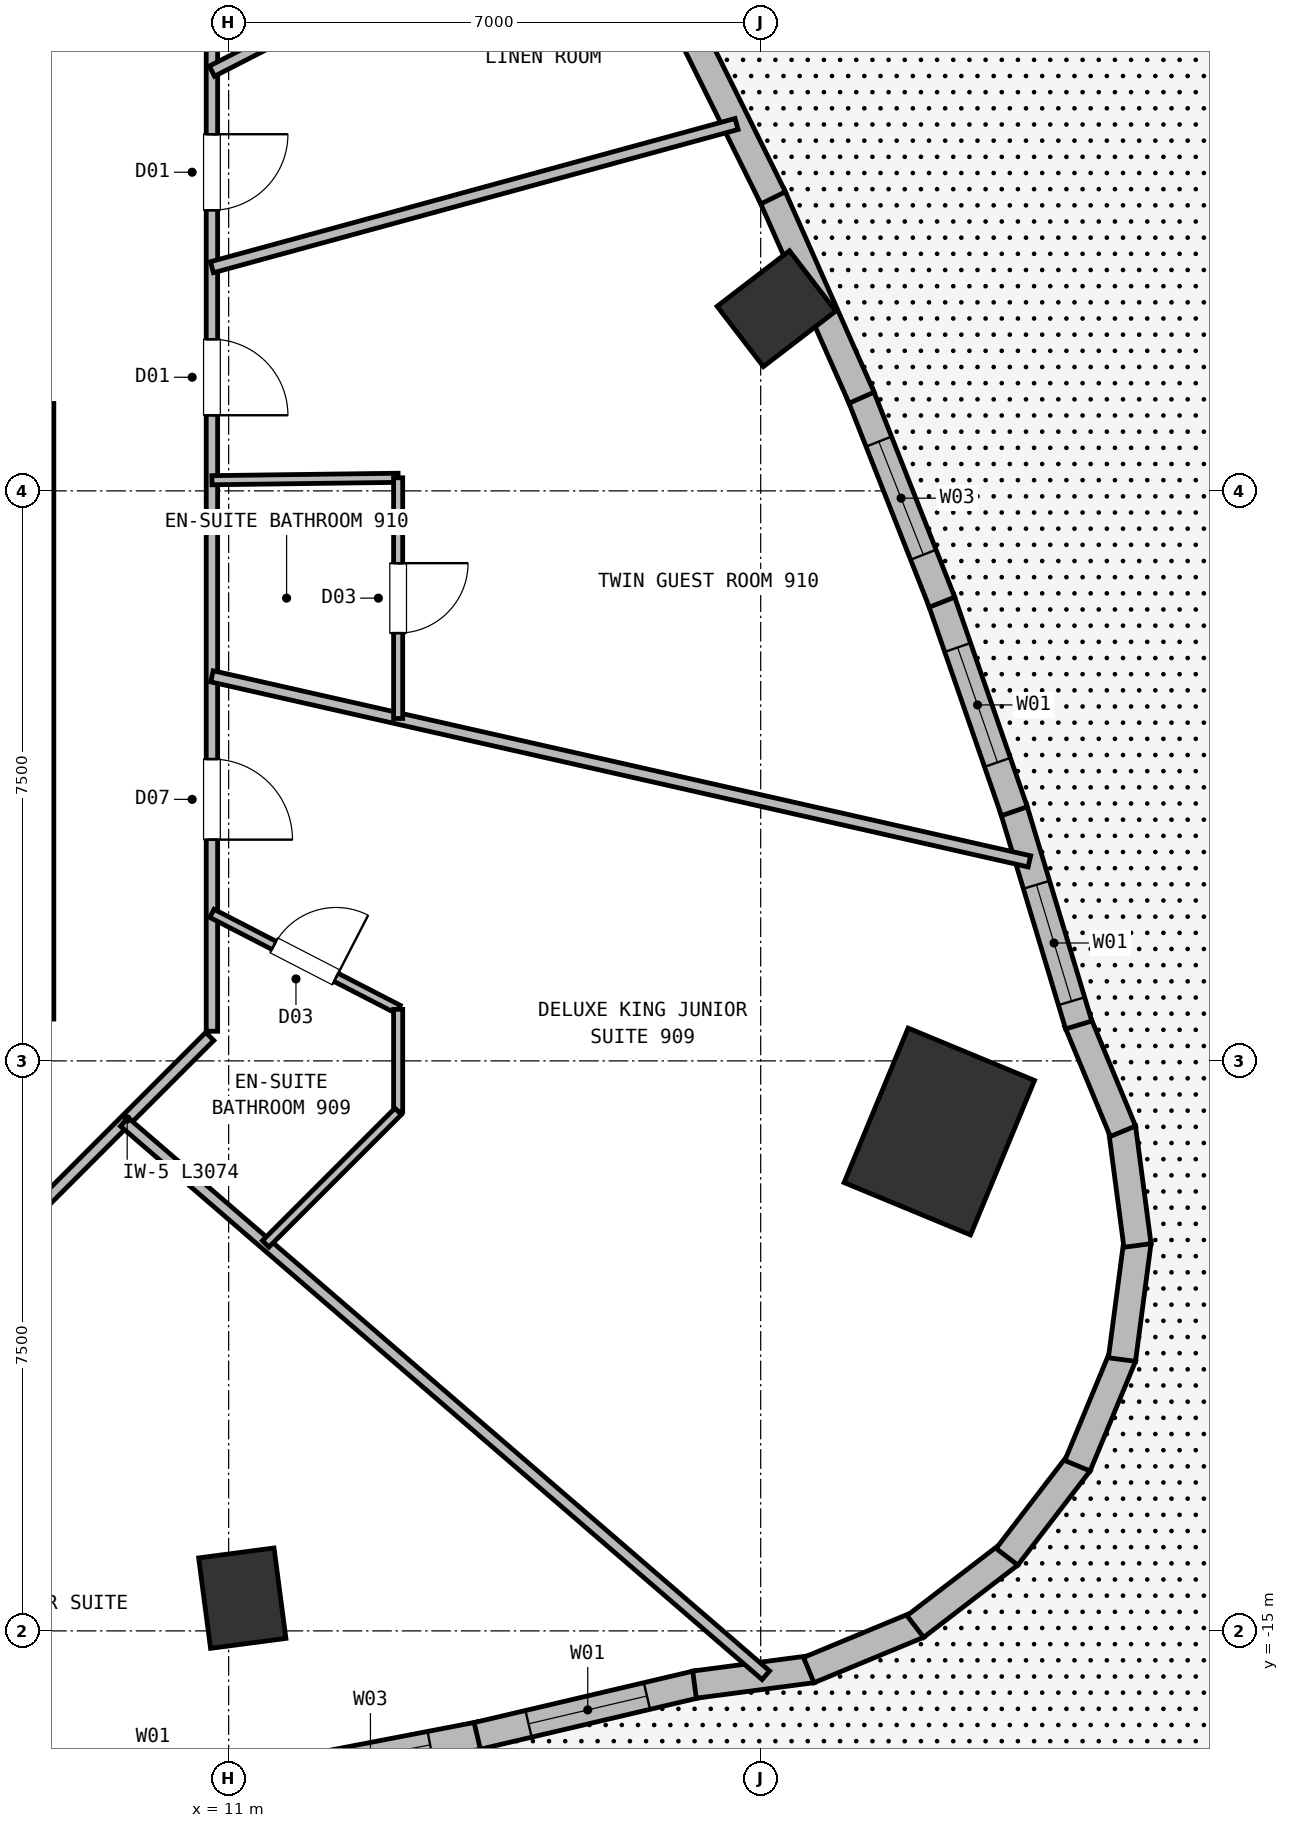
"""IFC4 building model, lengths in metres.
Left out: names, types, materials, properties, quantities, classifications, styles, units other than length and angle.
Written with IfcOpenShell. Run it as: python <this file> out.ifc"""

import sys

from ifc_helpers import new_model, si_unit, direction, frame, frame_2d, origin, origin_2d, place, context, subcontext, project, spatial, rectangle, extrude, element, fill, save


model = new_model("IFC4")
c1 = context("Model", 3, precision=1e-05, world=origin(), true_north=direction((0.0, 1.0)))
c2 = subcontext(c1, "Body", "Model", "MODEL_VIEW")
j1 = project(units=[si_unit("LENGTHUNIT", "METRE"), si_unit("PLANEANGLEUNIT", "RADIAN")], contexts=[c1])
p1 = place(None, origin())
s1 = spatial("IfcSite", under=j1, at=p1, CompositionType="ELEMENT")
p2 = place(p1, origin())
s2 = spatial("IfcBuilding", under=s1, at=p2, CompositionType="ELEMENT")
p3 = place(p2, frame((0.0, 0.0, 30.5)))
s3 = spatial("IfcBuildingStorey", under=s2, at=p3, CompositionType="ELEMENT", Elevation=30.5)
p4 = place(p3, frame((8.35, -6.95, 0.0), z_axis=(0.0, 0.0, 1.0), x_axis=(0.0, 1.0, 0.0)))
e1 = element("IfcWall", 1, at=p4, inside=s3, PredefinedType="SHEAR", context=c2, shape_type="SweptSolid", body=[
    extrude(rectangle(XDim=8.1, YDim=0.7, at=frame_2d((4.05, 0.0))), origin(), (0.0, 0.0, 1.0), 3.5),
])
p5 = place(p3, frame((11.179, -14.569, 0.0), z_axis=(0.0, 0.0, 1.0), x_axis=(0.991444861374, 0.13052619222, 0.0)))
e2 = element("IfcColumn", 2, at=p5, inside=s3, PredefinedType="COLUMN", context=c2, shape_type="SweptSolid", body=[
    extrude(rectangle(XDim=1.0, YDim=1.2, at=origin_2d()), origin(), (0.0, 0.0, 1.0), 3.75),
])
p6 = place(p3, frame((20.35, -8.429, 0.0), z_axis=(0.0, 0.0, 1.0), x_axis=(-0.923879532511, 0.382683432365, 0.0)))
e3 = element("IfcColumn", 3, at=p6, inside=s3, PredefinedType="COLUMN", context=c2, shape_type="SweptSolid", body=[
    extrude(rectangle(XDim=1.8, YDim=2.2, at=origin_2d()), origin(), (0.0, 0.0, 1.0), 3.75),
])
p7 = place(p3, frame((18.207, 2.397, 0.0), z_axis=(0.0, 0.0, 1.0), x_axis=(-0.608761429009, 0.793353340291, 0.0)))
e4 = element("IfcColumn", 4, at=p7, inside=s3, PredefinedType="COLUMN", context=c2, shape_type="SweptSolid", body=[
    extrude(rectangle(XDim=1.0, YDim=1.2, at=origin_2d()), origin(), (0.0, 0.0, 1.0), 3.75),
])
p8 = place(p3, frame((14.32, -16.371, 0.0), z_axis=(0.0, 0.0, 1.0), x_axis=(-0.981984682903, -0.188960531711, 0.0)))
e5 = element("IfcWall", 5, at=p8, inside=s3, PredefinedType="SOLIDWALL", context=c2, shape_type="SweptSolid", body=[
    extrude(rectangle(XDim=2.961, YDim=0.36, at=frame_2d((1.481, 0.0))), origin(), (0.0, 0.0, 1.0), 3.5),
])
p9 = place(p8, frame((0.681, 0.0, 0.72)))
e6 = element("IfcOpeningElement", 6, at=p9, cuts=e5, PredefinedType="OPENING", context=c2, shape_type="SweptSolid", body=[
    extrude(rectangle(XDim=1.6, YDim=1.88, at=frame_2d((0.8, 0.94))), frame((0.0, 0.19, 0.0), z_axis=(0.0, -1.0, 0.0), x_axis=(1.0, 0.0, 0.0)), (0.0, 0.0, 1.0), 0.38),
])
p10 = place(p3, frame((17.178, -15.698, 0.0), z_axis=(0.0, 0.0, 1.0), x_axis=(-0.973460028485, -0.228857101575, 0.0)))
e7 = element("IfcWall", 7, at=p10, inside=s3, PredefinedType="SOLIDWALL", context=c2, shape_type="SweptSolid", body=[
    extrude(rectangle(XDim=2.987, YDim=0.36, at=frame_2d((1.494, 0.0))), origin(), (0.0, 0.0, 1.0), 3.5),
])
p11 = place(p10, frame((0.694, 0.0, 0.72)))
e8 = element("IfcOpeningElement", 8, at=p11, cuts=e7, PredefinedType="OPENING", context=c2, shape_type="SweptSolid", body=[
    extrude(rectangle(XDim=1.6, YDim=1.88, at=frame_2d((0.8, 0.94))), frame((0.0, 0.19, 0.0), z_axis=(0.0, -1.0, 0.0), x_axis=(1.0, 0.0, 0.0)), (0.0, 0.0, 1.0), 0.38),
])
for number, where, z_axis, x_axis in (
    (9, (18.68, -15.503, 0.0), (0.0, 0.0, 1.0), (-0.991, -0.131, 0.0)),
    (10, (20.077, -14.917, 0.0), (0.0, 0.0, 1.0), (-0.924, -0.383, 0.0)),
    (11, (21.275, -13.99, 0.0), (0.0, 0.0, 1.0), (-0.793, -0.609, 0.0)),
    (12, (22.192, -12.784, 0.0), (0.0, 0.0, 1.0), (-0.609, -0.793, 0.0)),
):
    element("IfcWall", number, at=place(p3, frame(where, z_axis=z_axis, x_axis=x_axis)), inside=s3, PredefinedType="SOLIDWALL", context=c2, shape_type="SweptSolid", body=[
        extrude(rectangle(XDim=1.564, YDim=0.36, at=frame_2d((0.782, 0.0))), origin(), (0.0, 0.0, 1.0), 3.5),
    ])
p12 = place(p3, frame((22.766, -11.382, 0.0), z_axis=(0.0, 0.0, 1.0), x_axis=(-0.382774588958, -0.923841768945, 0.0)))
e13 = element("IfcWall", 13, at=p12, inside=s3, PredefinedType="SOLIDWALL", context=c2, shape_type="SweptSolid", body=[
    extrude(rectangle(XDim=1.564, YDim=0.36, at=frame_2d((0.782, 0.0))), origin(), (0.0, 0.0, 1.0), 3.5),
])
for number, where, z_axis, x_axis in (
    (14, (22.958, -9.879, 0.0), (0.0, 0.0, 1.0), (-0.131, -0.991, 0.0)),
    (15, (22.753, -8.378, 0.0), (0.0, 0.0, 1.0), (0.131, -0.991, 0.0)),
    (16, (22.167, -6.981, 0.0), (0.0, 0.0, 1.0), (0.383, -0.924, 0.0)),
):
    element("IfcWall", number, at=place(p3, frame(where, z_axis=z_axis, x_axis=x_axis)), inside=s3, PredefinedType="SOLIDWALL", context=c2, shape_type="SweptSolid", body=[
        extrude(rectangle(XDim=1.564, YDim=0.36, at=frame_2d((0.782, 0.0))), origin(), (0.0, 0.0, 1.0), 3.5),
    ])
p13 = place(p3, frame((21.323, -4.168, 0.0), z_axis=(0.0, 0.0, 1.0), x_axis=(0.288532480862, -0.957470107882, 0.0)))
e17 = element("IfcWall", 17, at=p13, inside=s3, PredefinedType="SOLIDWALL", context=c2, shape_type="SweptSolid", body=[
    extrude(rectangle(XDim=2.987, YDim=0.36, at=frame_2d((1.493, 0.0))), origin(), (0.0, 0.0, 1.0), 3.5),
])
p14 = place(p13, frame((1.06, 0.0, 0.72)))
e18 = element("IfcOpeningElement", 18, at=p14, cuts=e17, PredefinedType="OPENING", context=c2, shape_type="SweptSolid", body=[
    extrude(rectangle(XDim=1.6, YDim=1.88, at=frame_2d((0.8, 0.94))), frame((0.0, 0.19, 0.0), z_axis=(0.0, -1.0, 0.0), x_axis=(1.0, 0.0, 0.0)), (0.0, 0.0, 1.0), 0.38),
])
p15 = place(p3, frame((20.368, -1.417, 0.0), z_axis=(0.0, 0.0, 1.0), x_axis=(0.327385218266, -0.944890956069, 0.0)))
e19 = element("IfcWall", 19, at=p15, inside=s3, PredefinedType="SOLIDWALL", context=c2, shape_type="SweptSolid", body=[
    extrude(rectangle(XDim=2.961, YDim=0.36, at=frame_2d((1.48, 0.0))), origin(), (0.0, 0.0, 1.0), 3.5),
])
p16 = place(p15, frame((0.681, 0.0, 0.72)))
e20 = element("IfcOpeningElement", 20, at=p16, cuts=e19, PredefinedType="OPENING", context=c2, shape_type="SweptSolid", body=[
    extrude(rectangle(XDim=1.6, YDim=1.88, at=frame_2d((0.8, 0.94))), frame((0.0, 0.19, 0.0), z_axis=(0.0, -1.0, 0.0), x_axis=(1.0, 0.0, 0.0)), (0.0, 0.0, 1.0), 0.38),
])
p17 = place(p3, frame((19.308, 1.272, 0.0), z_axis=(0.0, 0.0, 1.0), x_axis=(0.366361181184, -0.930472721213, 0.0)))
e21 = element("IfcWall", 21, at=p17, inside=s3, PredefinedType="SOLIDWALL", context=c2, shape_type="SweptSolid", body=[
    extrude(rectangle(XDim=2.941, YDim=0.36, at=frame_2d((1.47, 0.0))), origin(), (0.0, 0.0, 1.0), 3.5),
])
p18 = place(p17, frame((0.67, 0.0, 0.72)))
e22 = element("IfcOpeningElement", 22, at=p18, cuts=e21, PredefinedType="OPENING", context=c2, shape_type="SweptSolid", body=[
    extrude(rectangle(XDim=1.6, YDim=1.88, at=frame_2d((0.8, 0.94))), frame((0.0, 0.19, 0.0), z_axis=(0.0, -1.0, 0.0), x_axis=(1.0, 0.0, 0.0)), (0.0, 0.0, 1.0), 0.38),
])
p19 = place(p3, frame((18.143, 3.901, 0.0), z_axis=(0.0, 0.0, 1.0), x_axis=(0.405100583427, -0.914272124319, 0.0)))
e23 = element("IfcWall", 23, at=p19, inside=s3, PredefinedType="SOLIDWALL", context=c2, shape_type="SweptSolid", body=[
    extrude(rectangle(XDim=2.925, YDim=0.36, at=frame_2d((1.463, 0.0))), origin(), (0.0, 0.0, 1.0), 3.5),
])
p20 = place(p3, frame((16.871, 6.468, 0.0), z_axis=(0.0, 0.0, 1.0), x_axis=(0.44365878996, -0.896195781117, 0.0)))
e24 = element("IfcWall", 24, at=p20, inside=s3, PredefinedType="SOLIDWALL", context=c2, shape_type="SweptSolid", body=[
    extrude(rectangle(XDim=2.915, YDim=0.36, at=frame_2d((1.458, 0.0))), origin(), (0.0, 0.0, 1.0), 3.5),
])
p21 = place(p3, frame((10.752, -7.178, 0.0), z_axis=(0.0, 0.0, 1.0), x_axis=(-0.707067066127, -0.707146494016, 0.0)))
e25 = element("IfcWall", 25, at=p21, inside=s3, PredefinedType="PARTITIONING", context=c2, shape_type="SweptSolid", body=[
    extrude(rectangle(XDim=3.074, YDim=0.15, at=frame_2d((1.537, 0.0))), origin(), (0.0, 0.0, 1.0), 3.12),
])
p22 = place(p3, frame((10.78, 7.11, 0.0), z_axis=(0.0, 0.0, 1.0), x_axis=(0.0, -1.0, 0.0)))
e26 = element("IfcWall", 26, at=p22, inside=s3, PredefinedType="PARTITIONING", context=c2, shape_type="SweptSolid", body=[
    extrude(rectangle(XDim=14.22, YDim=0.15, at=frame_2d((7.11, 0.0))), origin(), (0.0, 0.0, 1.0), 3.12),
])
p23 = place(p22, frame((0.14, 0.0, 0.0)))
e27 = element("IfcOpeningElement", 27, at=p23, cuts=e26, PredefinedType="OPENING", context=c2, shape_type="SweptSolid", body=[
    extrude(rectangle(XDim=0.86, YDim=2.05, at=frame_2d((0.43, 1.025))), frame((0.0, 0.085, 0.0), z_axis=(0.0, -1.0, 0.0), x_axis=(1.0, 0.0, 0.0)), (0.0, 0.0, 1.0), 0.17),
])
p24 = place(p22, frame((2.417, 0.0, 0.0)))
e28 = element("IfcOpeningElement", 28, at=p24, cuts=e26, PredefinedType="OPENING", context=c2, shape_type="SweptSolid", body=[
    extrude(rectangle(XDim=1.0, YDim=2.15, at=frame_2d((0.5, 1.075))), frame((0.0, 0.085, 0.0), z_axis=(0.0, -1.0, 0.0), x_axis=(1.0, 0.0, 0.0)), (0.0, 0.0, 1.0), 0.17),
])
p25 = place(p22, frame((5.115, 0.0, 0.0)))
e29 = element("IfcOpeningElement", 29, at=p25, cuts=e26, PredefinedType="OPENING", context=c2, shape_type="SweptSolid", body=[
    extrude(rectangle(XDim=1.0, YDim=2.15, at=frame_2d((0.5, 1.075))), frame((0.0, 0.085, 0.0), z_axis=(0.0, -1.0, 0.0), x_axis=(1.0, 0.0, 0.0)), (0.0, 0.0, 1.0), 0.17),
])
p26 = place(p22, frame((10.639, 0.0, 0.0)))
e30 = element("IfcOpeningElement", 30, at=p26, cuts=e26, PredefinedType="OPENING", context=c2, shape_type="SweptSolid", body=[
    extrude(rectangle(XDim=1.06, YDim=2.15, at=frame_2d((0.53, 1.075))), frame((0.0, 0.085, 0.0), z_axis=(0.0, -1.0, 0.0), x_axis=(1.0, 0.0, 0.0)), (0.0, 0.0, 1.0), 0.17),
])
p27 = place(p3, frame((9.627, -8.303, 0.0), z_axis=(0.0, 0.0, 1.0), x_axis=(0.757238499589, -0.653138465212, 0.0)))
e31 = element("IfcWall", 31, at=p27, inside=s3, PredefinedType="PARTITIONING", context=c2, shape_type="SweptSolid", body=[
    extrude(rectangle(XDim=11.147, YDim=0.15, at=frame_2d((5.573, 0.0))), origin(), (0.0, 0.0, 1.0), 3.5),
])
p28 = place(p3, frame((10.78, -5.559, 0.0), z_axis=(0.0, 0.0, 1.0), x_axis=(0.888777799958, -0.458338327333, 0.0)))
e32 = element("IfcWall", 32, at=p28, inside=s3, PredefinedType="PARTITIONING", context=c2, shape_type="SweptSolid", body=[
    extrude(rectangle(XDim=2.757, YDim=0.12, at=frame_2d((1.378, 0.0))), origin(), (0.0, 0.0, 1.0), 3.5),
])
p29 = place(p28, frame((0.918, 0.0, 0.0)))
e33 = element("IfcOpeningElement", 33, at=p29, cuts=e32, PredefinedType="OPENING", context=c2, shape_type="SweptSolid", body=[
    extrude(rectangle(XDim=0.92, YDim=2.1, at=frame_2d((0.46, 1.05))), frame((0.0, 0.07, 0.0), z_axis=(0.0, -1.0, 0.0), x_axis=(1.0, 0.0, 0.0)), (0.0, 0.0, 1.0), 0.14),
])
p30 = place(p3, frame((13.23, -6.822, 0.0), z_axis=(0.0, 0.0, 1.0), x_axis=(0.0, -1.0, 0.0)))
e34 = element("IfcWall", 34, at=p30, inside=s3, PredefinedType="PARTITIONING", context=c2, shape_type="SweptSolid", body=[
    extrude(rectangle(XDim=1.343, YDim=0.12, at=frame_2d((0.671, 0.0))), origin(), (0.0, 0.0, 1.0), 3.5),
])
p31 = place(p3, frame((13.23, -8.165, 0.0), z_axis=(0.0, 0.0, 1.0), x_axis=(-0.707106781187, -0.707106781187, 0.0)))
e35 = element("IfcWall", 35, at=p31, inside=s3, PredefinedType="PARTITIONING", context=c2, shape_type="SweptSolid", body=[
    extrude(rectangle(XDim=2.465, YDim=0.12, at=frame_2d((1.232, 0.0))), origin(), (0.0, 0.0, 1.0), 3.12),
])
p32 = place(p3, frame((10.78, -2.44, 0.0), z_axis=(0.0, 0.0, 1.0), x_axis=(0.97532517317, -0.220773201681, 0.0)))
e36 = element("IfcWall", 36, at=p32, inside=s3, PredefinedType="PARTITIONING", context=c2, shape_type="SweptSolid", body=[
    extrude(rectangle(XDim=11.028, YDim=0.15, at=frame_2d((5.514, 0.0))), origin(), (0.0, 0.0, 1.0), 3.5),
])
p33 = place(p3, frame((13.23, 0.172, 0.0), z_axis=(0.0, 0.0, 1.0), x_axis=(-0.999916098969, -0.012953571785, 0.0)))
e37 = element("IfcWall", 37, at=p33, inside=s3, PredefinedType="PARTITIONING", context=c2, shape_type="SweptSolid", body=[
    extrude(rectangle(XDim=2.45, YDim=0.12, at=frame_2d((1.225, 0.0))), origin(), (0.0, 0.0, 1.0), 3.5),
])
p34 = place(p3, frame((13.23, 0.172, 0.0), z_axis=(0.0, 0.0, 1.0), x_axis=(0.0, -1.0, 0.0)))
e38 = element("IfcWall", 38, at=p34, inside=s3, PredefinedType="PARTITIONING", context=c2, shape_type="SweptSolid", body=[
    extrude(rectangle(XDim=3.167, YDim=0.12, at=frame_2d((1.583, 0.0))), origin(), (0.0, 0.0, 1.0), 3.12),
])
p35 = place(p34, frame((1.124, 0.0, 0.0)))
e39 = element("IfcOpeningElement", 39, at=p35, cuts=e38, PredefinedType="OPENING", context=c2, shape_type="SweptSolid", body=[
    extrude(rectangle(XDim=0.92, YDim=2.1, at=frame_2d((0.46, 1.05))), frame((0.0, 0.07, 0.0), z_axis=(0.0, -1.0, 0.0), x_axis=(1.0, 0.0, 0.0)), (0.0, 0.0, 1.0), 0.14),
])
p36 = place(p3, frame((10.78, 2.943, 0.0), z_axis=(0.0, 0.0, 1.0), x_axis=(0.964692920296, 0.263377238063, 0.0)))
e40 = element("IfcWall", 40, at=p36, inside=s3, PredefinedType="PARTITIONING", context=c2, shape_type="SweptSolid", body=[
    extrude(rectangle(XDim=7.155, YDim=0.15, at=frame_2d((3.578, 0.0))), origin(), (0.0, 0.0, 1.0), 3.5),
])
p37 = place(p3, frame((10.78, 5.522, 0.0), z_axis=(0.0, 0.0, 1.0), x_axis=(0.889994161799, 0.455971920149, 0.0)))
e41 = element("IfcWall", 41, at=p37, inside=s3, PredefinedType="PARTITIONING", context=c2, shape_type="SweptSolid", body=[
    extrude(rectangle(XDim=5.795, YDim=0.15, at=frame_2d((2.897, 0.0))), origin(), (0.0, 0.0, 1.0), 3.5),
])
p38 = place(p9, origin())
e42 = element("IfcWindow", 42, at=p38, inside=s3, PartitioningType="SINGLE_PANEL", PredefinedType="WINDOW", context=c2, shape_type="SweptSolid", body=[
    extrude(rectangle(XDim=1.6, YDim=1.88, at=frame_2d((0.8, 0.94))), frame((0.0, 0.03, 0.0), z_axis=(0.0, -1.0, 0.0), x_axis=(1.0, 0.0, 0.0)), (0.0, 0.0, 1.0), 0.06),
])
fill(e6, e42)
p39 = place(p11, origin())
e43 = element("IfcWindow", 43, at=p39, inside=s3, PartitioningType="SINGLE_PANEL", PredefinedType="WINDOW", context=c2, shape_type="SweptSolid", body=[
    extrude(rectangle(XDim=1.6, YDim=1.88, at=frame_2d((0.8, 0.94))), frame((0.0, 0.03, 0.0), z_axis=(0.0, -1.0, 0.0), x_axis=(1.0, 0.0, 0.0)), (0.0, 0.0, 1.0), 0.06),
])
fill(e8, e43)
p40 = place(p14, origin())
e44 = element("IfcWindow", 44, at=p40, inside=s3, PartitioningType="SINGLE_PANEL", PredefinedType="WINDOW", context=c2, shape_type="SweptSolid", body=[
    extrude(rectangle(XDim=1.6, YDim=1.88, at=frame_2d((0.8, 0.94))), frame((0.0, 0.03, 0.0), z_axis=(0.0, -1.0, 0.0), x_axis=(1.0, 0.0, 0.0)), (0.0, 0.0, 1.0), 0.06),
])
fill(e18, e44)
p41 = place(p16, origin())
e45 = element("IfcWindow", 45, at=p41, inside=s3, PartitioningType="SINGLE_PANEL", PredefinedType="WINDOW", context=c2, shape_type="SweptSolid", body=[
    extrude(rectangle(XDim=1.6, YDim=1.88, at=frame_2d((0.8, 0.94))), frame((0.0, 0.03, 0.0), z_axis=(0.0, -1.0, 0.0), x_axis=(1.0, 0.0, 0.0)), (0.0, 0.0, 1.0), 0.06),
])
fill(e20, e45)
p42 = place(p18, origin())
e46 = element("IfcWindow", 46, at=p42, inside=s3, PartitioningType="SINGLE_PANEL", PredefinedType="WINDOW", context=c2, shape_type="SweptSolid", body=[
    extrude(rectangle(XDim=1.6, YDim=1.88, at=frame_2d((0.8, 0.94))), frame((0.0, 0.03, 0.0), z_axis=(0.0, -1.0, 0.0), x_axis=(1.0, 0.0, 0.0)), (0.0, 0.0, 1.0), 0.06),
])
fill(e22, e46)
p43 = place(p29, origin())
e47 = element("IfcDoor", 47, at=p43, inside=s3, OperationType="SINGLE_SWING_RIGHT", PredefinedType="DOOR", context=c2, shape_type="SweptSolid", body=[
    extrude(rectangle(XDim=0.92, YDim=2.1, at=frame_2d((0.46, 1.05))), frame((0.0, 0.025, 0.0), z_axis=(0.0, -1.0, 0.0), x_axis=(1.0, 0.0, 0.0)), (0.0, 0.0, 1.0), 0.05),
])
fill(e33, e47)
p44 = place(p35, origin())
e48 = element("IfcDoor", 48, at=p44, inside=s3, OperationType="SINGLE_SWING_LEFT", PredefinedType="DOOR", context=c2, shape_type="SweptSolid", body=[
    extrude(rectangle(XDim=0.92, YDim=2.1, at=frame_2d((0.46, 1.05))), frame((0.0, 0.025, 0.0), z_axis=(0.0, -1.0, 0.0), x_axis=(1.0, 0.0, 0.0)), (0.0, 0.0, 1.0), 0.05),
])
fill(e39, e48)
p45 = place(p24, origin())
e49 = element("IfcDoor", 49, at=p45, inside=s3, OperationType="SINGLE_SWING_LEFT", PredefinedType="DOOR", context=c2, shape_type="SweptSolid", body=[
    extrude(rectangle(XDim=1.0, YDim=2.15, at=frame_2d((0.5, 1.075))), frame((0.0, 0.025, 0.0), z_axis=(0.0, -1.0, 0.0), x_axis=(1.0, 0.0, 0.0)), (0.0, 0.0, 1.0), 0.05),
])
fill(e28, e49)
p46 = place(p25, origin())
e50 = element("IfcDoor", 50, at=p46, inside=s3, OperationType="SINGLE_SWING_RIGHT", PredefinedType="DOOR", context=c2, shape_type="SweptSolid", body=[
    extrude(rectangle(XDim=1.0, YDim=2.15, at=frame_2d((0.5, 1.075))), frame((0.0, 0.025, 0.0), z_axis=(0.0, -1.0, 0.0), x_axis=(1.0, 0.0, 0.0)), (0.0, 0.0, 1.0), 0.05),
])
fill(e29, e50)
p47 = place(p26, origin())
e51 = element("IfcDoor", 51, at=p47, inside=s3, OperationType="SINGLE_SWING_RIGHT", PredefinedType="DOOR", context=c2, shape_type="SweptSolid", body=[
    extrude(rectangle(XDim=1.06, YDim=2.15, at=frame_2d((0.53, 1.075))), frame((0.0, 0.025, 0.0), z_axis=(0.0, -1.0, 0.0), x_axis=(1.0, 0.0, 0.0)), (0.0, 0.0, 1.0), 0.05),
])
fill(e30, e51)
save(model, sys.argv[1])
